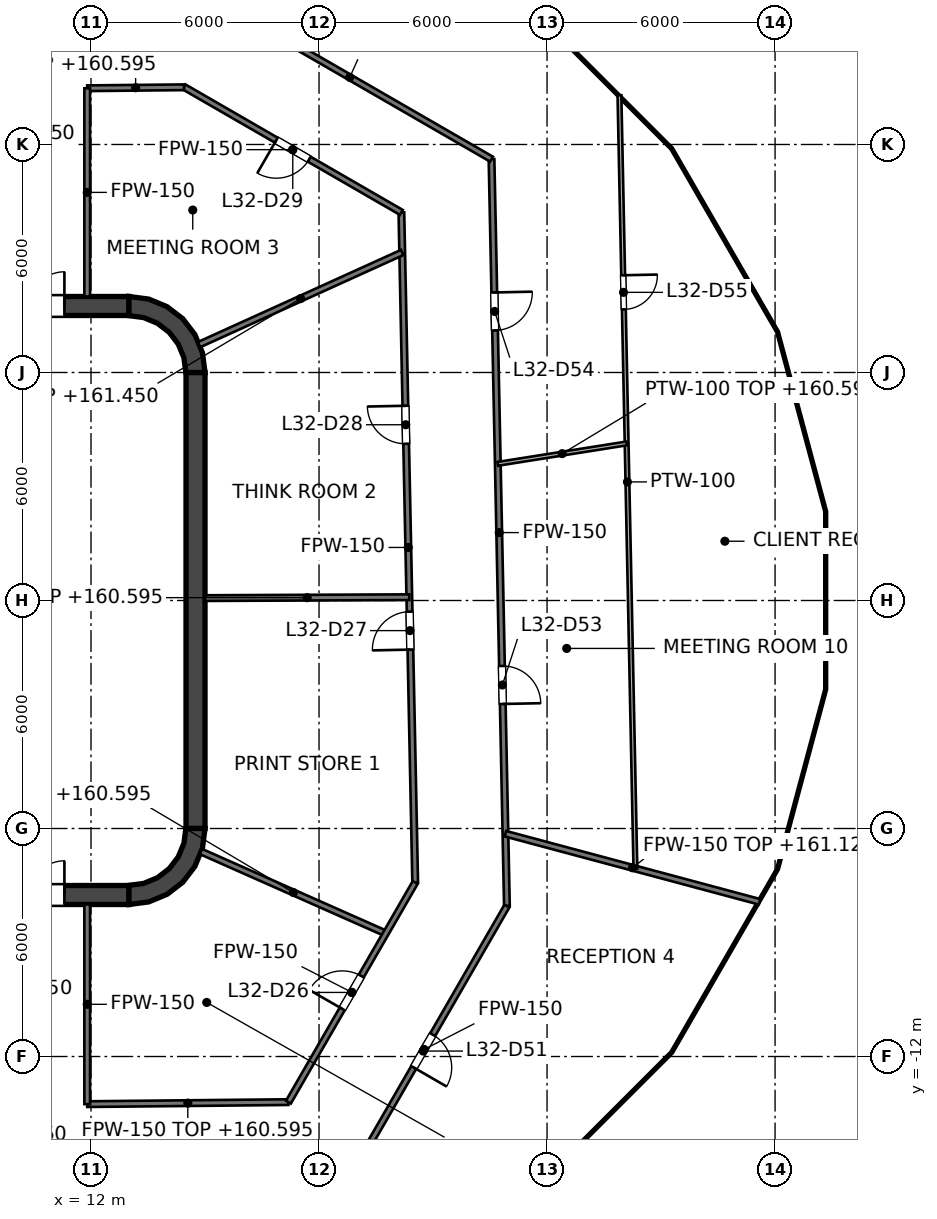
"""IFC4 building model, lengths in metres.
Left out: names, types, materials, properties, quantities, classifications, styles, units other than length and angle.
Written with IfcOpenShell. Run it as: python <this file> out.ifc"""

import sys

from ifc_helpers import new_model, si_unit, direction, frame, frame_2d, origin, place, context, subcontext, project, spatial, polyline, rectangle, outline, extrude, element, fill, save


model = new_model("IFC4")
c1 = context("Model", 3, precision=1e-05, world=origin(), true_north=direction((0.0, 1.0)))
c2 = subcontext(c1, "Body", "Model", "MODEL_VIEW")
j1 = project(units=[si_unit("LENGTHUNIT", "METRE"), si_unit("PLANEANGLEUNIT", "RADIAN")], contexts=[c1])
p1 = place(None, origin())
s1 = spatial("IfcSite", under=j1, at=p1, CompositionType="ELEMENT")
p2 = place(p1, origin())
s2 = spatial("IfcBuilding", under=s1, at=p2, CompositionType="ELEMENT")
p3 = place(p2, frame((0.0, 0.0, 157.6)))
s3 = spatial("IfcBuildingStorey", under=s2, at=p3, CompositionType="ELEMENT", Elevation=157.6)
p4 = place(p3, frame((-13.0, 7.75, 0.0), z_axis=(0.0, 0.0, 1.0), x_axis=(1.0, 0.0, 0.0)))
e1 = element("IfcWall", 1, at=p4, inside=s3, PredefinedType="SHEAR", context=c2, shape_type="SweptSolid", body=[
    extrude(rectangle(XDim=26.0, YDim=0.5, at=frame_2d((13.0, 0.0))), origin(), (0.0, 0.0, 1.0), 4.0),
])
p5 = place(p4, frame((1.7, 0.0, 0.0)))
e2 = element("IfcOpeningElement", 2, at=p5, cuts=e1, PredefinedType="OPENING", context=c2, shape_type="SweptSolid", body=[
    extrude(rectangle(XDim=1.8, YDim=2.1, at=frame_2d((0.9, 1.05))), frame((0.0, 0.25, 0.0), z_axis=(0.0, -1.0, 0.0), x_axis=(1.0, 0.0, 0.0)), (0.0, 0.0, 1.0), 0.5),
])
p6 = place(p4, frame((22.5, 0.0, 0.0)))
e3 = element("IfcOpeningElement", 3, at=p6, cuts=e1, PredefinedType="OPENING", context=c2, shape_type="SweptSolid", body=[
    extrude(rectangle(XDim=1.8, YDim=2.1, at=frame_2d((0.9, 1.05))), frame((0.0, 0.25, 0.0), z_axis=(0.0, -1.0, 0.0), x_axis=(1.0, 0.0, 0.0)), (0.0, 0.0, 1.0), 0.5),
])
p7 = place(p3, frame((-13.0, -7.75, 0.0), z_axis=(0.0, 0.0, 1.0), x_axis=(1.0, 0.0, 0.0)))
e4 = element("IfcWall", 4, at=p7, inside=s3, PredefinedType="SHEAR", context=c2, shape_type="SweptSolid", body=[
    extrude(rectangle(XDim=26.0, YDim=0.5, at=frame_2d((13.0, 0.0))), origin(), (0.0, 0.0, 1.0), 4.0),
])
p8 = place(p7, frame((1.7, 0.0, 0.0)))
e5 = element("IfcOpeningElement", 5, at=p8, cuts=e4, PredefinedType="OPENING", context=c2, shape_type="SweptSolid", body=[
    extrude(rectangle(XDim=1.8, YDim=2.1, at=frame_2d((0.9, 1.05))), frame((0.0, 0.25, 0.0), z_axis=(0.0, -1.0, 0.0), x_axis=(1.0, 0.0, 0.0)), (0.0, 0.0, 1.0), 0.5),
])
p9 = place(p7, frame((22.5, 0.0, 0.0)))
e6 = element("IfcOpeningElement", 6, at=p9, cuts=e4, PredefinedType="OPENING", context=c2, shape_type="SweptSolid", body=[
    extrude(rectangle(XDim=1.8, YDim=2.1, at=frame_2d((0.9, 1.05))), frame((0.0, 0.25, 0.0), z_axis=(0.0, -1.0, 0.0), x_axis=(1.0, 0.0, 0.0)), (0.0, 0.0, 1.0), 0.5),
])
p10 = place(p3, frame((14.75, -6.0, 0.0), z_axis=(0.0, 0.0, 1.0), x_axis=(0.0, 1.0, 0.0)))
e7 = element("IfcWall", 7, at=p10, inside=s3, PredefinedType="SHEAR", context=c2, shape_type="SweptSolid", body=[
    extrude(rectangle(XDim=12.0, YDim=0.5, at=frame_2d((6.0, 0.0))), origin(), (0.0, 0.0, 1.0), 4.0),
])
p11 = place(p3, origin())
e8 = element("IfcWall", 8, at=p11, inside=s3, PredefinedType="SHEAR", context=c2, shape_type="SweptSolid", body=[
    extrude(outline(polyline([(13.0, 8.0), (13.0, 7.496), (13.387, 7.445), (13.748, 7.295), (14.058, 7.058), (14.295, 6.748), (14.445, 6.387), (14.496, 6.0), (15.0, 6.0), (14.932, 6.518), (14.732, 7.0), (14.414, 7.414), (14.0, 7.732), (13.518, 7.932), (13.0, 8.0)])), origin(), (0.0, 0.0, 1.0), 4.0),
])
e9 = element("IfcWall", 9, at=p11, inside=s3, PredefinedType="SHEAR", context=c2, shape_type="SweptSolid", body=[
    extrude(outline(polyline([(15.0, -6.0), (14.496, -6.0), (14.445, -6.387), (14.295, -6.748), (14.058, -7.058), (13.748, -7.295), (13.387, -7.445), (13.0, -7.496), (13.0, -8.0), (13.518, -7.932), (14.0, -7.732), (14.414, -7.414), (14.732, -7.0), (14.932, -6.518), (15.0, -6.0)])), origin(), (0.0, 0.0, 1.0), 4.0),
])
p12 = place(p3, frame((11.8, -7.5, 0.0), z_axis=(0.0, 0.0, 1.0), x_axis=(0.0, 1.0, 0.0)))
e10 = element("IfcWall", 10, at=p12, inside=s3, PredefinedType="SOLIDWALL", context=c2, shape_type="SweptSolid", body=[
    extrude(rectangle(XDim=15.0, YDim=0.4, at=frame_2d((7.5, 0.0))), origin(), (0.0, 0.0, 1.0), 3.85),
])
p13 = place(p12, frame((11.3, 0.0, 0.0)))
e11 = element("IfcOpeningElement", 11, at=p13, cuts=e10, PredefinedType="OPENING", context=c2, shape_type="SweptSolid", body=[
    extrude(rectangle(XDim=1.1, YDim=2.1, at=frame_2d((0.55, 1.05))), frame((0.0, 0.2, 0.0), z_axis=(0.0, -1.0, 0.0), x_axis=(1.0, 0.0, 0.0)), (0.0, 0.0, 1.0), 0.4),
])
p14 = place(p12, frame((8.4, 0.0, 0.0)))
e12 = element("IfcOpeningElement", 12, at=p14, cuts=e10, PredefinedType="OPENING", context=c2, shape_type="SweptSolid", body=[
    extrude(rectangle(XDim=1.1, YDim=2.1, at=frame_2d((0.55, 1.05))), frame((0.0, 0.2, 0.0), z_axis=(0.0, -1.0, 0.0), x_axis=(1.0, 0.0, 0.0)), (0.0, 0.0, 1.0), 0.4),
])
p15 = place(p12, frame((5.5, 0.0, 0.0)))
e13 = element("IfcOpeningElement", 13, at=p15, cuts=e10, PredefinedType="OPENING", context=c2, shape_type="SweptSolid", body=[
    extrude(rectangle(XDim=1.1, YDim=2.1, at=frame_2d((0.55, 1.05))), frame((0.0, 0.2, 0.0), z_axis=(0.0, -1.0, 0.0), x_axis=(1.0, 0.0, 0.0)), (0.0, 0.0, 1.0), 0.4),
])
p16 = place(p12, frame((13.697, 0.0, 0.0)))
e14 = element("IfcOpeningElement", 14, at=p16, cuts=e10, PredefinedType="OPENING", context=c2, shape_type="SweptSolid", body=[
    extrude(rectangle(XDim=0.9, YDim=2.1, at=frame_2d((0.45, 1.05))), frame((0.0, 0.2, 0.0), z_axis=(0.0, -1.0, 0.0), x_axis=(1.0, 0.0, 0.0)), (0.0, 0.0, 1.0), 0.4),
])
p17 = place(p12, frame((0.403, 0.0, 0.0)))
e15 = element("IfcOpeningElement", 15, at=p17, cuts=e10, PredefinedType="OPENING", context=c2, shape_type="SweptSolid", body=[
    extrude(rectangle(XDim=0.9, YDim=2.1, at=frame_2d((0.45, 1.05))), frame((0.0, 0.2, 0.0), z_axis=(0.0, -1.0, 0.0), x_axis=(1.0, 0.0, 0.0)), (0.0, 0.0, 1.0), 0.4),
])
e16 = element("IfcWall", 16, at=p11, inside=s3, PredefinedType="SOLIDWALL", context=c2, shape_type="SweptSolid", body=[
    extrude(outline(polyline([(12.0, -5.675), (12.0, -5.925), (14.25, -5.925), (14.5, -5.925), (14.5, -5.675), (14.5, -3.025), (14.5, -2.775), (14.5, -0.125), (14.5, 0.125), (14.5, 2.775), (14.5, 3.025), (14.5, 5.675), (14.5, 5.925), (14.25, 5.925), (12.0, 5.925), (12.0, 5.675), (14.25, 5.675), (14.25, 3.025), (12.0, 3.025), (12.0, 2.775), (14.25, 2.775), (14.25, 0.125), (12.0, 0.125), (12.0, -0.125), (14.25, -0.125), (14.25, -2.775), (12.0, -2.775), (12.0, -3.025), (14.25, -3.025), (14.25, -5.675), (12.0, -5.675)])), origin(), (0.0, 0.0, 1.0), 3.85),
])
p18 = place(p3, frame((20.167, 10.213, 0.0), z_axis=(0.0, 0.0, 1.0), x_axis=(0.020610894613, -0.999787572949, 0.0)))
e17 = element("IfcWall", 17, at=p18, inside=s3, PredefinedType="PARTITIONING", context=c2, shape_type="SweptSolid", body=[
    extrude(rectangle(XDim=17.637, YDim=0.15, at=frame_2d((8.819, 0.0))), origin(), (0.0, 0.0, 1.0), 2.927),
])
p19 = place(p18, frame((10.508, 0.0, 0.0)))
e18 = element("IfcOpeningElement", 18, at=p19, cuts=e17, PredefinedType="OPENING", context=c2, shape_type="SweptSolid", body=[
    extrude(rectangle(XDim=1.0, YDim=2.1, at=frame_2d((0.5, 1.05))), frame((0.0, 0.075, 0.0), z_axis=(0.0, -1.0, 0.0), x_axis=(1.0, 0.0, 0.0)), (0.0, 0.0, 1.0), 0.15),
])
p20 = place(p18, frame((5.09, 0.0, 0.0)))
e19 = element("IfcOpeningElement", 19, at=p20, cuts=e17, PredefinedType="OPENING", context=c2, shape_type="SweptSolid", body=[
    extrude(rectangle(XDim=1.0, YDim=2.1, at=frame_2d((0.5, 1.05))), frame((0.0, 0.075, 0.0), z_axis=(0.0, -1.0, 0.0), x_axis=(1.0, 0.0, 0.0)), (0.0, 0.0, 1.0), 0.15),
])
p21 = place(p3, frame((22.539, 11.615, 0.0), z_axis=(0.0, 0.0, 1.0), x_axis=(0.020601506683, -0.99978776644, 0.0)))
e20 = element("IfcWall", 20, at=p21, inside=s3, PredefinedType="PARTITIONING", context=c2, shape_type="SweptSolid", body=[
    extrude(rectangle(XDim=19.66, YDim=0.15, at=frame_2d((9.83, 0.0))), origin(), (0.0, 0.0, 1.0), 2.927),
])
p22 = place(p21, frame((13.341, 0.0, 0.0)))
e21 = element("IfcOpeningElement", 21, at=p22, cuts=e20, PredefinedType="OPENING", context=c2, shape_type="SweptSolid", body=[
    extrude(rectangle(XDim=1.0, YDim=2.1, at=frame_2d((0.5, 1.05))), frame((0.0, 0.075, 0.0), z_axis=(0.0, -1.0, 0.0), x_axis=(1.0, 0.0, 0.0)), (0.0, 0.0, 1.0), 0.15),
])
p23 = place(p21, frame((3.51, 0.0, 0.0)))
e22 = element("IfcOpeningElement", 22, at=p23, cuts=e20, PredefinedType="OPENING", context=c2, shape_type="SweptSolid", body=[
    extrude(rectangle(XDim=1.0, YDim=2.1, at=frame_2d((0.5, 1.05))), frame((0.0, 0.075, 0.0), z_axis=(0.0, -1.0, 0.0), x_axis=(1.0, 0.0, 0.0)), (0.0, 0.0, 1.0), 0.15),
])
p24 = place(p3, frame((14.448, 13.515, 0.0), z_axis=(0.0, 0.0, 1.0), x_axis=(0.865975016585, -0.500087263036, 0.0)))
e23 = element("IfcWall", 23, at=p24, inside=s3, PredefinedType="PARTITIONING", context=c2, shape_type="SweptSolid", body=[
    extrude(rectangle(XDim=6.604, YDim=0.15, at=frame_2d((3.302, 0.0))), origin(), (0.0, 0.0, 1.0), 2.927),
])
p25 = place(p24, frame((2.804, 0.0, 0.0)))
e24 = element("IfcOpeningElement", 24, at=p25, cuts=e23, PredefinedType="OPENING", context=c2, shape_type="SweptSolid", body=[
    extrude(rectangle(XDim=1.0, YDim=2.1, at=frame_2d((0.5, 1.05))), frame((0.0, 0.075, 0.0), z_axis=(0.0, -1.0, 0.0), x_axis=(1.0, 0.0, 0.0)), (0.0, 0.0, 1.0), 0.15),
])
p26 = place(p3, frame((15.08, 15.921, 0.0), z_axis=(0.0, 0.0, 1.0), x_axis=(0.865982112089, -0.50007497592, 0.0)))
e25 = element("IfcWall", 25, at=p26, inside=s3, PredefinedType="PARTITIONING", context=c2, shape_type="SweptSolid", body=[
    extrude(rectangle(XDim=8.613, YDim=0.15, at=frame_2d((4.306, 0.0))), origin(), (0.0, 0.0, 1.0), 2.927),
])
p27 = place(p3, frame((14.895, -6.607, 0.0), z_axis=(0.0, 0.0, 1.0), x_axis=(0.914233271379, -0.405188259337, 0.0)))
e26 = element("IfcWall", 26, at=p27, inside=s3, PredefinedType="PARTITIONING", context=c2, shape_type="SweptSolid", body=[
    extrude(rectangle(XDim=5.317, YDim=0.15, at=frame_2d((2.659, 0.0))), origin(), (0.0, 0.0, 1.0), 2.995),
])
p28 = place(p3, frame((22.905, -6.137, 0.0), z_axis=(0.0, 0.0, 1.0), x_axis=(0.965908688021, -0.25888299752, 0.0)))
e27 = element("IfcWall", 27, at=p28, inside=s3, PredefinedType="PARTITIONING", context=c2, shape_type="SweptSolid", body=[
    extrude(rectangle(XDim=6.922, YDim=0.15, at=frame_2d((3.461, 0.0))), origin(), (0.0, 0.0, 1.0), 3.527),
])
p29 = place(p3, frame((15.0, 0.063, 0.0), z_axis=(0.0, 0.0, 1.0), x_axis=(0.999990294223, 0.004405843865, 0.0)))
e28 = element("IfcWall", 28, at=p29, inside=s3, PredefinedType="PARTITIONING", context=c2, shape_type="SweptSolid", body=[
    extrude(rectangle(XDim=5.375, YDim=0.15, at=frame_2d((2.688, 0.0))), origin(), (0.0, 0.0, 1.0), 2.995),
])
p30 = place(p3, frame((11.9, -13.253, 0.0), z_axis=(0.0, 0.0, 1.0), x_axis=(0.999950853109, 0.009914200296, 0.0)))
e29 = element("IfcWall", 29, at=p30, inside=s3, PredefinedType="PARTITIONING", context=c2, shape_type="SweptSolid", body=[
    extrude(rectangle(XDim=5.294, YDim=0.15, at=frame_2d((2.647, 0.0))), origin(), (0.0, 0.0, 1.0), 2.995),
])
p31 = place(p3, frame((11.9, 13.48, 0.0), z_axis=(0.0, 0.0, 1.0), x_axis=(0.999950357576, 0.009964054536, 0.0)))
e30 = element("IfcWall", 30, at=p31, inside=s3, PredefinedType="PARTITIONING", context=c2, shape_type="SweptSolid", body=[
    extrude(rectangle(XDim=2.548, YDim=0.15, at=frame_2d((1.274, 0.0))), origin(), (0.0, 0.0, 1.0), 2.995),
])
p32 = place(p3, frame((14.843, 6.733, 0.0), z_axis=(0.0, 0.0, 1.0), x_axis=(0.910628361306, 0.413226315214, 0.0)))
e31 = element("IfcWall", 31, at=p32, inside=s3, PredefinedType="PARTITIONING", context=c2, shape_type="SweptSolid", body=[
    extrude(rectangle(XDim=5.87, YDim=0.15, at=frame_2d((2.935, 0.0))), origin(), (0.0, 0.0, 1.0), 3.85),
])
p33 = place(p3, frame((18.587, -15.587, 0.0), z_axis=(0.0, 0.0, 1.0), x_axis=(0.500005419212, 0.866022274979, 0.0)))
e32 = element("IfcWall", 32, at=p33, inside=s3, PredefinedType="PARTITIONING", context=c2, shape_type="SweptSolid", body=[
    extrude(rectangle(XDim=8.713, YDim=0.15, at=frame_2d((4.357, 0.0))), origin(), (0.0, 0.0, 1.0), 2.927),
])
p34 = place(p33, frame((3.808, 0.0, 0.0)))
e33 = element("IfcOpeningElement", 33, at=p34, cuts=e32, PredefinedType="OPENING", context=c2, shape_type="SweptSolid", body=[
    extrude(rectangle(XDim=1.0, YDim=2.1, at=frame_2d((0.5, 1.05))), frame((0.0, 0.075, 0.0), z_axis=(0.0, -1.0, 0.0), x_axis=(1.0, 0.0, 0.0)), (0.0, 0.0, 1.0), 0.15),
])
p35 = place(p3, frame((17.194, -13.201, 0.0), z_axis=(0.0, 0.0, 1.0), x_axis=(0.499983182885, 0.866035112932, 0.0)))
e34 = element("IfcWall", 34, at=p35, inside=s3, PredefinedType="PARTITIONING", context=c2, shape_type="SweptSolid", body=[
    extrude(rectangle(XDim=6.674, YDim=0.15, at=frame_2d((3.337, 0.0))), origin(), (0.0, 0.0, 1.0), 2.927),
])
p36 = place(p35, frame((2.834, 0.0, 0.0)))
e35 = element("IfcOpeningElement", 35, at=p36, cuts=e34, PredefinedType="OPENING", context=c2, shape_type="SweptSolid", body=[
    extrude(rectangle(XDim=1.0, YDim=2.1, at=frame_2d((0.5, 1.05))), frame((0.0, 0.075, 0.0), z_axis=(0.0, -1.0, 0.0), x_axis=(1.0, 0.0, 0.0)), (0.0, 0.0, 1.0), 0.15),
])
p37 = place(p3, frame((11.9, -13.253, 0.0), z_axis=(0.0, 0.0, 1.0), x_axis=(0.0, 1.0, 0.0)))
e36 = element("IfcWall", 36, at=p37, inside=s3, PredefinedType="PARTITIONING", context=c2, shape_type="SweptSolid", body=[
    extrude(rectangle(XDim=5.253, YDim=0.15, at=frame_2d((2.626, 0.0))), origin(), (0.0, 0.0, 1.0), 2.927),
])
p38 = place(p3, frame((11.9, 8.0, 0.0), z_axis=(0.0, 0.0, 1.0), x_axis=(0.0, 1.0, 0.0)))
e37 = element("IfcWall", 37, at=p38, inside=s3, PredefinedType="PARTITIONING", context=c2, shape_type="SweptSolid", body=[
    extrude(rectangle(XDim=5.479, YDim=0.15, at=frame_2d((2.74, 0.0))), origin(), (0.0, 0.0, 1.0), 2.927),
])
p39 = place(p3, frame((25.905, 13.295, 0.0), z_axis=(0.0, 0.0, 1.0), x_axis=(0.020631727872, -0.999787143249, 0.0)))
e38 = element("IfcWall", 38, at=p39, inside=s3, PredefinedType="PARTITIONING", context=c2, shape_type="SweptSolid", body=[
    extrude(rectangle(XDim=20.353, YDim=0.1, at=frame_2d((10.177, 0.0))), origin(), (0.0, 0.0, 1.0), 2.927),
])
p40 = place(p39, frame((4.737, 0.0, 0.0)))
e39 = element("IfcOpeningElement", 39, at=p40, cuts=e38, PredefinedType="OPENING", context=c2, shape_type="SweptSolid", body=[
    extrude(rectangle(XDim=0.9, YDim=2.1, at=frame_2d((0.45, 1.05))), frame((0.0, 0.05, 0.0), z_axis=(0.0, -1.0, 0.0), x_axis=(1.0, 0.0, 0.0)), (0.0, 0.0, 1.0), 0.1),
])
p41 = place(p3, frame((22.704, 3.596, 0.0), z_axis=(0.0, 0.0, 1.0), x_axis=(0.987679194201, 0.156492202178, 0.0)))
e40 = element("IfcWall", 40, at=p41, inside=s3, PredefinedType="PARTITIONING", context=c2, shape_type="SweptSolid", body=[
    extrude(rectangle(XDim=3.432, YDim=0.1, at=frame_2d((1.716, 0.0))), origin(), (0.0, 0.0, 1.0), 2.995),
])
p42 = place(p13, origin())
e41 = element("IfcDoor", 41, at=p42, inside=s3, OperationType="DOUBLE_DOOR_SLIDING", PredefinedType="DOOR", context=c2, shape_type="SweptSolid", body=[
    extrude(rectangle(XDim=1.1, YDim=2.1, at=frame_2d((0.55, 1.05))), frame((0.0, 0.025, 0.0), z_axis=(0.0, -1.0, 0.0), x_axis=(1.0, 0.0, 0.0)), (0.0, 0.0, 1.0), 0.05),
])
fill(e11, e41)
p43 = place(p14, origin())
e42 = element("IfcDoor", 42, at=p43, inside=s3, OperationType="DOUBLE_DOOR_SLIDING", PredefinedType="DOOR", context=c2, shape_type="SweptSolid", body=[
    extrude(rectangle(XDim=1.1, YDim=2.1, at=frame_2d((0.55, 1.05))), frame((0.0, 0.025, 0.0), z_axis=(0.0, -1.0, 0.0), x_axis=(1.0, 0.0, 0.0)), (0.0, 0.0, 1.0), 0.05),
])
fill(e12, e42)
p44 = place(p15, origin())
e43 = element("IfcDoor", 43, at=p44, inside=s3, OperationType="DOUBLE_DOOR_SLIDING", PredefinedType="DOOR", context=c2, shape_type="SweptSolid", body=[
    extrude(rectangle(XDim=1.1, YDim=2.1, at=frame_2d((0.55, 1.05))), frame((0.0, 0.025, 0.0), z_axis=(0.0, -1.0, 0.0), x_axis=(1.0, 0.0, 0.0)), (0.0, 0.0, 1.0), 0.05),
])
fill(e13, e43)
p45 = place(p16, origin())
e44 = element("IfcDoor", 44, at=p45, inside=s3, OperationType="SINGLE_SWING_RIGHT", PredefinedType="DOOR", context=c2, shape_type="SweptSolid", body=[
    extrude(rectangle(XDim=0.9, YDim=2.1, at=frame_2d((0.45, 1.05))), frame((0.0, 0.025, 0.0), z_axis=(0.0, -1.0, 0.0), x_axis=(1.0, 0.0, 0.0)), (0.0, 0.0, 1.0), 0.05),
])
fill(e14, e44)
p46 = place(p17, origin())
e45 = element("IfcDoor", 45, at=p46, inside=s3, OperationType="SINGLE_SWING_RIGHT", PredefinedType="DOOR", context=c2, shape_type="SweptSolid", body=[
    extrude(rectangle(XDim=0.9, YDim=2.1, at=frame_2d((0.45, 1.05))), frame((0.0, 0.025, 0.0), z_axis=(0.0, -1.0, 0.0), x_axis=(1.0, 0.0, 0.0)), (0.0, 0.0, 1.0), 0.05),
])
fill(e15, e45)
p47 = place(p6, origin())
e46 = element("IfcDoor", 46, at=p47, inside=s3, OperationType="DOUBLE_DOOR_SINGLE_SWING", PredefinedType="DOOR", context=c2, shape_type="SweptSolid", body=[
    extrude(rectangle(XDim=1.8, YDim=2.1, at=frame_2d((0.9, 1.05))), frame((0.0, 0.025, 0.0), z_axis=(0.0, -1.0, 0.0), x_axis=(1.0, 0.0, 0.0)), (0.0, 0.0, 1.0), 0.05),
])
fill(e3, e46)
p48 = place(p9, origin())
e47 = element("IfcDoor", 47, at=p48, inside=s3, OperationType="DOUBLE_DOOR_SINGLE_SWING", PredefinedType="DOOR", context=c2, shape_type="SweptSolid", body=[
    extrude(rectangle(XDim=1.8, YDim=2.1, at=frame_2d((0.9, 1.05))), frame((0.0, 0.025, 0.0), z_axis=(0.0, -1.0, 0.0), x_axis=(1.0, 0.0, 0.0)), (0.0, 0.0, 1.0), 0.05),
])
fill(e6, e47)
p49 = place(p36, origin())
e48 = element("IfcDoor", 48, at=p49, inside=s3, OperationType="SINGLE_SWING_LEFT", PredefinedType="DOOR", context=c2, shape_type="SweptSolid", body=[
    extrude(rectangle(XDim=1.0, YDim=2.1, at=frame_2d((0.5, 1.05))), frame((0.0, 0.025, 0.0), z_axis=(0.0, -1.0, 0.0), x_axis=(1.0, 0.0, 0.0)), (0.0, 0.0, 1.0), 0.05),
])
fill(e35, e48)
p50 = place(p19, origin())
e49 = element("IfcDoor", 49, at=p50, inside=s3, OperationType="SINGLE_SWING_RIGHT", PredefinedType="DOOR", context=c2, shape_type="SweptSolid", body=[
    extrude(rectangle(XDim=1.0, YDim=2.1, at=frame_2d((0.5, 1.05))), frame((0.0, 0.025, 0.0), z_axis=(0.0, -1.0, 0.0), x_axis=(1.0, 0.0, 0.0)), (0.0, 0.0, 1.0), 0.05),
])
fill(e18, e49)
p51 = place(p20, origin())
e50 = element("IfcDoor", 50, at=p51, inside=s3, OperationType="SINGLE_SWING_LEFT", PredefinedType="DOOR", context=c2, shape_type="SweptSolid", body=[
    extrude(rectangle(XDim=1.0, YDim=2.1, at=frame_2d((0.5, 1.05))), frame((0.0, 0.025, 0.0), z_axis=(0.0, -1.0, 0.0), x_axis=(1.0, 0.0, 0.0)), (0.0, 0.0, 1.0), 0.05),
])
fill(e19, e50)
p52 = place(p25, origin())
e51 = element("IfcDoor", 51, at=p52, inside=s3, OperationType="SINGLE_SWING_LEFT", PredefinedType="DOOR", context=c2, shape_type="SweptSolid", body=[
    extrude(rectangle(XDim=1.0, YDim=2.1, at=frame_2d((0.5, 1.05))), frame((0.0, 0.025, 0.0), z_axis=(0.0, -1.0, 0.0), x_axis=(1.0, 0.0, 0.0)), (0.0, 0.0, 1.0), 0.05),
])
fill(e24, e51)
p53 = place(p34, origin())
e52 = element("IfcDoor", 52, at=p53, inside=s3, OperationType="SINGLE_SWING_LEFT", PredefinedType="DOOR", context=c2, shape_type="SweptSolid", body=[
    extrude(rectangle(XDim=1.0, YDim=2.1, at=frame_2d((0.5, 1.05))), frame((0.0, 0.025, 0.0), z_axis=(0.0, -1.0, 0.0), x_axis=(1.0, 0.0, 0.0)), (0.0, 0.0, 1.0), 0.05),
])
fill(e33, e52)
p54 = place(p22, origin())
e53 = element("IfcDoor", 53, at=p54, inside=s3, OperationType="SINGLE_SWING_RIGHT", PredefinedType="DOOR", context=c2, shape_type="SweptSolid", body=[
    extrude(rectangle(XDim=1.0, YDim=2.1, at=frame_2d((0.5, 1.05))), frame((0.0, 0.025, 0.0), z_axis=(0.0, -1.0, 0.0), x_axis=(1.0, 0.0, 0.0)), (0.0, 0.0, 1.0), 0.05),
])
fill(e21, e53)
p55 = place(p23, origin())
e54 = element("IfcDoor", 54, at=p55, inside=s3, OperationType="SINGLE_SWING_LEFT", PredefinedType="DOOR", context=c2, shape_type="SweptSolid", body=[
    extrude(rectangle(XDim=1.0, YDim=2.1, at=frame_2d((0.5, 1.05))), frame((0.0, 0.025, 0.0), z_axis=(0.0, -1.0, 0.0), x_axis=(1.0, 0.0, 0.0)), (0.0, 0.0, 1.0), 0.05),
])
fill(e22, e54)
p56 = place(p40, origin())
e55 = element("IfcDoor", 55, at=p56, inside=s3, OperationType="SINGLE_SWING_LEFT", PredefinedType="DOOR", context=c2, shape_type="SweptSolid", body=[
    extrude(rectangle(XDim=0.9, YDim=2.1, at=frame_2d((0.45, 1.05))), frame((0.0, 0.025, 0.0), z_axis=(0.0, -1.0, 0.0), x_axis=(1.0, 0.0, 0.0)), (0.0, 0.0, 1.0), 0.05),
])
fill(e39, e55)
save(model, sys.argv[1])
